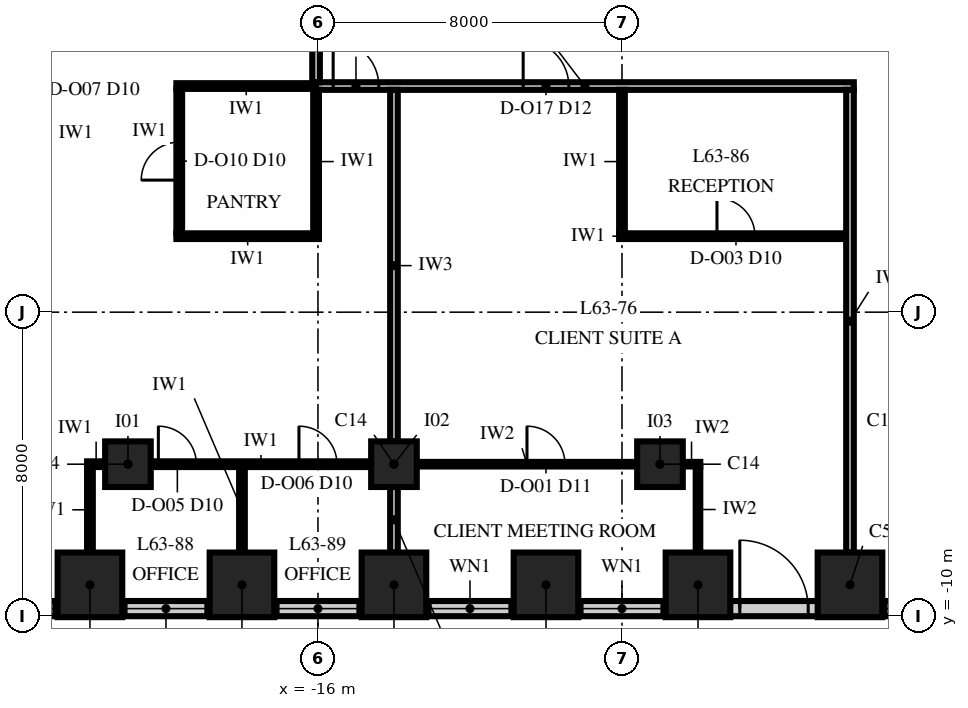
"""IFC4 building model, lengths in metres.
Left out: names, types, materials, properties, quantities, classifications, styles, units other than length and angle.
Written with IfcOpenShell. Run it as: python <this file> out.ifc"""

import sys

from ifc_helpers import new_model, si_unit, direction, frame, frame_2d, origin, origin_2d, place, context, subcontext, project, spatial, rectangle, extrude, element, fill, save


model = new_model("IFC4")
c1 = context("Model", 3, precision=1e-05, world=origin(), true_north=direction((0.0, 1.0)))
c2 = subcontext(c1, "Body", "Model", "MODEL_VIEW")
j1 = project(units=[si_unit("LENGTHUNIT", "METRE"), si_unit("PLANEANGLEUNIT", "RADIAN")], contexts=[c1])
p1 = place(None, origin())
s1 = spatial("IfcSite", under=j1, at=p1, CompositionType="ELEMENT")
p2 = place(p1, origin())
s2 = spatial("IfcBuilding", under=s1, at=p2, CompositionType="ELEMENT")
p3 = place(p2, frame((0.0, 0.0, 272.0)))
s3 = spatial("IfcBuildingStorey", under=s2, at=p3, CompositionType="ELEMENT", Elevation=272.0)
for number, where, z_axis, x_axis in (
    (1, (-22.0, -9.175, -0.25), (0.0, 0.0, 1.0), (1.0, 0.0, 0.0)),
    (2, (-18.0, -9.175, -0.25), (0.0, 0.0, 1.0), (1.0, 0.0, 0.0)),
    (3, (-14.0, -9.175, -0.25), (0.0, 0.0, 1.0), (1.0, 0.0, 0.0)),
    (4, (-10.0, -9.175, -0.25), (0.0, 0.0, 1.0), (1.0, 0.0, 0.0)),
    (5, (-6.0, -9.175, -0.25), (0.0, 0.0, 1.0), (1.0, 0.0, 0.0)),
    (6, (-2.0, -9.175, -0.25), (0.0, 0.0, 1.0), (1.0, 0.0, 0.0)),
):
    element("IfcColumn", number, at=place(p3, frame(where, z_axis=z_axis, x_axis=x_axis)), inside=s3, PredefinedType="COLUMN", context=c2, shape_type="SweptSolid", body=[
        extrude(rectangle(XDim=1.7, YDim=1.7, at=origin_2d()), origin(), (0.0, 0.0, 1.0), 4.25),
    ])
for number, where, z_axis, x_axis in (
    (7, (-21.0, -6.0, 0.0), (0.0, 0.0, 1.0), (1.0, 0.0, 0.0)),
    (8, (-14.0, -6.0, 0.0), (0.0, 0.0, 1.0), (1.0, 0.0, 0.0)),
    (9, (-7.0, -6.0, 0.0), (0.0, 0.0, 1.0), (1.0, 0.0, 0.0)),
):
    element("IfcColumn", number, at=place(p3, frame(where, z_axis=z_axis, x_axis=x_axis)), inside=s3, PredefinedType="COLUMN", context=c2, shape_type="SweptSolid", body=[
        extrude(rectangle(XDim=1.2, YDim=1.2, at=origin_2d()), origin(), (0.0, 0.0, 1.0), 4.0),
    ])
p4 = place(p3, frame((-26.0, -9.8, 0.0), z_axis=(0.0, 0.0, 1.0), x_axis=(1.0, 0.0, 0.0)))
e10 = element("IfcWall", 10, at=p4, inside=s3, PredefinedType="SOLIDWALL", context=c2, shape_type="SweptSolid", body=[
    extrude(rectangle(XDim=52.0, YDim=0.4, at=frame_2d((26.0, 0.0))), origin(), (0.0, 0.0, 1.0), 2.0),
])
p5 = place(p4, frame((0.95, 0.0, 0.8)))
e11 = element("IfcOpeningElement", 11, at=p5, cuts=e10, PredefinedType="OPENING", context=c2, shape_type="SweptSolid", body=[
    extrude(rectangle(XDim=2.1, YDim=1.15, at=frame_2d((1.05, 0.575))), frame((0.0, 0.215, 0.0), z_axis=(0.0, -1.0, 0.0), x_axis=(1.0, 0.0, 0.0)), (0.0, 0.0, 1.0), 0.43),
])
p6 = place(p4, frame((4.95, 0.0, 0.8)))
e12 = element("IfcOpeningElement", 12, at=p6, cuts=e10, PredefinedType="OPENING", context=c2, shape_type="SweptSolid", body=[
    extrude(rectangle(XDim=2.1, YDim=1.15, at=frame_2d((1.05, 0.575))), frame((0.0, 0.215, 0.0), z_axis=(0.0, -1.0, 0.0), x_axis=(1.0, 0.0, 0.0)), (0.0, 0.0, 1.0), 0.43),
])
p7 = place(p4, frame((8.95, 0.0, 0.8)))
e13 = element("IfcOpeningElement", 13, at=p7, cuts=e10, PredefinedType="OPENING", context=c2, shape_type="SweptSolid", body=[
    extrude(rectangle(XDim=2.1, YDim=1.15, at=frame_2d((1.05, 0.575))), frame((0.0, 0.215, 0.0), z_axis=(0.0, -1.0, 0.0), x_axis=(1.0, 0.0, 0.0)), (0.0, 0.0, 1.0), 0.43),
])
p8 = place(p4, frame((12.95, 0.0, 0.8)))
e14 = element("IfcOpeningElement", 14, at=p8, cuts=e10, PredefinedType="OPENING", context=c2, shape_type="SweptSolid", body=[
    extrude(rectangle(XDim=2.1, YDim=1.15, at=frame_2d((1.05, 0.575))), frame((0.0, 0.215, 0.0), z_axis=(0.0, -1.0, 0.0), x_axis=(1.0, 0.0, 0.0)), (0.0, 0.0, 1.0), 0.43),
])
p9 = place(p4, frame((16.95, 0.0, 0.8)))
e15 = element("IfcOpeningElement", 15, at=p9, cuts=e10, PredefinedType="OPENING", context=c2, shape_type="SweptSolid", body=[
    extrude(rectangle(XDim=2.1, YDim=1.15, at=frame_2d((1.05, 0.575))), frame((0.0, 0.215, 0.0), z_axis=(0.0, -1.0, 0.0), x_axis=(1.0, 0.0, 0.0)), (0.0, 0.0, 1.0), 0.43),
])
p10 = place(p4, frame((21.1, 0.0, 0.0)))
e16 = element("IfcOpeningElement", 16, at=p10, cuts=e10, PredefinedType="OPENING", context=c2, shape_type="SweptSolid", body=[
    extrude(rectangle(XDim=1.8, YDim=2.0, at=frame_2d((0.9, 1.0))), frame((0.0, 0.215, 0.0), z_axis=(0.0, -1.0, 0.0), x_axis=(1.0, 0.0, 0.0)), (0.0, 0.0, 1.0), 0.43),
])
p11 = place(p4, frame((24.95, 0.0, 0.8)))
e17 = element("IfcOpeningElement", 17, at=p11, cuts=e10, PredefinedType="OPENING", context=c2, shape_type="SweptSolid", body=[
    extrude(rectangle(XDim=2.1, YDim=1.15, at=frame_2d((1.05, 0.575))), frame((0.0, 0.215, 0.0), z_axis=(0.0, -1.0, 0.0), x_axis=(1.0, 0.0, 0.0)), (0.0, 0.0, 1.0), 0.43),
])
p12 = place(p4, frame((29.1, 0.0, 0.0)))
e18 = element("IfcOpeningElement", 18, at=p12, cuts=e10, PredefinedType="OPENING", context=c2, shape_type="SweptSolid", body=[
    extrude(rectangle(XDim=1.8, YDim=2.0, at=frame_2d((0.9, 1.0))), frame((0.0, 0.215, 0.0), z_axis=(0.0, -1.0, 0.0), x_axis=(1.0, 0.0, 0.0)), (0.0, 0.0, 1.0), 0.43),
])
p13 = place(p4, frame((32.95, 0.0, 0.8)))
e19 = element("IfcOpeningElement", 19, at=p13, cuts=e10, PredefinedType="OPENING", context=c2, shape_type="SweptSolid", body=[
    extrude(rectangle(XDim=2.1, YDim=1.15, at=frame_2d((1.05, 0.575))), frame((0.0, 0.215, 0.0), z_axis=(0.0, -1.0, 0.0), x_axis=(1.0, 0.0, 0.0)), (0.0, 0.0, 1.0), 0.43),
])
p14 = place(p4, frame((36.95, 0.0, 0.8)))
e20 = element("IfcOpeningElement", 20, at=p14, cuts=e10, PredefinedType="OPENING", context=c2, shape_type="SweptSolid", body=[
    extrude(rectangle(XDim=2.1, YDim=1.15, at=frame_2d((1.05, 0.575))), frame((0.0, 0.215, 0.0), z_axis=(0.0, -1.0, 0.0), x_axis=(1.0, 0.0, 0.0)), (0.0, 0.0, 1.0), 0.43),
])
p15 = place(p4, frame((40.95, 0.0, 0.8)))
e21 = element("IfcOpeningElement", 21, at=p15, cuts=e10, PredefinedType="OPENING", context=c2, shape_type="SweptSolid", body=[
    extrude(rectangle(XDim=2.1, YDim=1.15, at=frame_2d((1.05, 0.575))), frame((0.0, 0.215, 0.0), z_axis=(0.0, -1.0, 0.0), x_axis=(1.0, 0.0, 0.0)), (0.0, 0.0, 1.0), 0.43),
])
p16 = place(p4, frame((44.95, 0.0, 0.8)))
e22 = element("IfcOpeningElement", 22, at=p16, cuts=e10, PredefinedType="OPENING", context=c2, shape_type="SweptSolid", body=[
    extrude(rectangle(XDim=2.1, YDim=1.15, at=frame_2d((1.05, 0.575))), frame((0.0, 0.215, 0.0), z_axis=(0.0, -1.0, 0.0), x_axis=(1.0, 0.0, 0.0)), (0.0, 0.0, 1.0), 0.43),
])
p17 = place(p4, frame((48.95, 0.0, 0.8)))
e23 = element("IfcOpeningElement", 23, at=p17, cuts=e10, PredefinedType="OPENING", context=c2, shape_type="SweptSolid", body=[
    extrude(rectangle(XDim=2.1, YDim=1.15, at=frame_2d((1.05, 0.575))), frame((0.0, 0.215, 0.0), z_axis=(0.0, -1.0, 0.0), x_axis=(1.0, 0.0, 0.0)), (0.0, 0.0, 1.0), 0.43),
])
p18 = place(p3, frame((-22.075, -6.0, 0.0), z_axis=(0.0, 0.0, 1.0), x_axis=(1.0, 0.0, 0.0)))
e24 = element("IfcWall", 24, at=p18, inside=s3, PredefinedType="PARTITIONING", context=c2, shape_type="SweptSolid", body=[
    extrude(rectangle(XDim=0.475, YDim=0.15, at=frame_2d((0.237, 0.0))), origin(), (0.0, 0.0, 1.0), 2.842),
])
p19 = place(p3, frame((-20.4, -6.0, 0.0), z_axis=(0.0, 0.0, 1.0), x_axis=(1.0, 0.0, 0.0)))
e25 = element("IfcWall", 25, at=p19, inside=s3, PredefinedType="PARTITIONING", context=c2, shape_type="SweptSolid", body=[
    extrude(rectangle(XDim=5.8, YDim=0.15, at=frame_2d((2.9, 0.0))), origin(), (0.0, 0.0, 1.0), 2.842),
])
p20 = place(p19, frame((0.2, 0.0, 0.0)))
e26 = element("IfcOpeningElement", 26, at=p20, cuts=e25, PredefinedType="OPENING", context=c2, shape_type="SweptSolid", body=[
    extrude(rectangle(XDim=1.0, YDim=2.3, at=frame_2d((0.5, 1.15))), frame((0.0, 0.09, 0.0), z_axis=(0.0, -1.0, 0.0), x_axis=(1.0, 0.0, 0.0)), (0.0, 0.0, 1.0), 0.18),
])
p21 = place(p19, frame((3.9, 0.0, 0.0)))
e27 = element("IfcOpeningElement", 27, at=p21, cuts=e25, PredefinedType="OPENING", context=c2, shape_type="SweptSolid", body=[
    extrude(rectangle(XDim=1.0, YDim=2.3, at=frame_2d((0.5, 1.15))), frame((0.0, 0.09, 0.0), z_axis=(0.0, -1.0, 0.0), x_axis=(1.0, 0.0, 0.0)), (0.0, 0.0, 1.0), 0.18),
])
p22 = place(p3, frame((-13.4, -6.0, 0.0), z_axis=(0.0, 0.0, 1.0), x_axis=(1.0, 0.0, 0.0)))
e28 = element("IfcWall", 28, at=p22, inside=s3, PredefinedType="PARTITIONING", context=c2, shape_type="SweptSolid", body=[
    extrude(rectangle(XDim=5.8, YDim=0.12, at=frame_2d((2.9, 0.0))), origin(), (0.0, 0.0, 1.0), 2.842),
])
p23 = place(p22, frame((2.9, 0.0, 0.0)))
e29 = element("IfcOpeningElement", 29, at=p23, cuts=e28, PredefinedType="OPENING", context=c2, shape_type="SweptSolid", body=[
    extrude(rectangle(XDim=1.0, YDim=2.4, at=frame_2d((0.5, 1.2))), frame((0.0, 0.075, 0.0), z_axis=(0.0, -1.0, 0.0), x_axis=(1.0, 0.0, 0.0)), (0.0, 0.0, 1.0), 0.15),
])
p24 = place(p3, frame((-6.4, -6.0, 0.0), z_axis=(0.0, 0.0, 1.0), x_axis=(1.0, 0.0, 0.0)))
e30 = element("IfcWall", 30, at=p24, inside=s3, PredefinedType="PARTITIONING", context=c2, shape_type="SweptSolid", body=[
    extrude(rectangle(XDim=0.46, YDim=0.12, at=frame_2d((0.23, 0.0))), origin(), (0.0, 0.0, 1.0), 2.842),
])
p25 = place(p3, frame((-19.725, 0.0, 0.0), z_axis=(0.0, 0.0, 1.0), x_axis=(1.0, 0.0, 0.0)))
e31 = element("IfcWall", 31, at=p25, inside=s3, PredefinedType="PARTITIONING", context=c2, shape_type="SweptSolid", body=[
    extrude(rectangle(XDim=3.75, YDim=0.15, at=frame_2d((1.875, 0.0))), origin(), (0.0, 0.0, 1.0), 3.23),
])
p26 = place(p3, frame((-8.075, 0.0, 0.0), z_axis=(0.0, 0.0, 1.0), x_axis=(1.0, 0.0, 0.0)))
e32 = element("IfcWall", 32, at=p26, inside=s3, PredefinedType="PARTITIONING", context=c2, shape_type="SweptSolid", body=[
    extrude(rectangle(XDim=5.975, YDim=0.15, at=frame_2d((2.987, 0.0))), origin(), (0.0, 0.0, 1.0), 3.23),
])
p27 = place(p26, frame((2.575, 0.0, 0.0)))
e33 = element("IfcOpeningElement", 33, at=p27, cuts=e32, PredefinedType="OPENING", context=c2, shape_type="SweptSolid", body=[
    extrude(rectangle(XDim=1.0, YDim=2.3, at=frame_2d((0.5, 1.15))), frame((0.0, 0.09, 0.0), z_axis=(0.0, -1.0, 0.0), x_axis=(1.0, 0.0, 0.0)), (0.0, 0.0, 1.0), 0.18),
])
p28 = place(p3, frame((-19.725, 3.95, 0.0), z_axis=(0.0, 0.0, 1.0), x_axis=(1.0, 0.0, 0.0)))
e34 = element("IfcWall", 34, at=p28, inside=s3, PredefinedType="PARTITIONING", context=c2, shape_type="SweptSolid", body=[
    extrude(rectangle(XDim=3.675, YDim=0.15, at=frame_2d((1.837, 0.0))), origin(), (0.0, 0.0, 1.0), 3.23),
])
p29 = place(p3, frame((-16.05, 3.95, 0.0), z_axis=(0.0, 0.0, 1.0), x_axis=(1.0, 0.0, 0.0)))
e35 = element("IfcWall", 35, at=p29, inside=s3, PredefinedType="PARTITIONING", context=c2, shape_type="SweptSolid", body=[
    extrude(rectangle(XDim=14.15, YDim=0.2, at=frame_2d((7.075, 0.0))), origin(), (0.0, 0.0, 1.0), 3.23),
])
p30 = place(p29, frame((5.45, 0.0, 0.0)))
e36 = element("IfcOpeningElement", 36, at=p30, cuts=e35, PredefinedType="OPENING", context=c2, shape_type="SweptSolid", body=[
    extrude(rectangle(XDim=1.2, YDim=2.4, at=frame_2d((0.6, 1.2))), frame((0.0, 0.115, 0.0), z_axis=(0.0, -1.0, 0.0), x_axis=(1.0, 0.0, 0.0)), (0.0, 0.0, 1.0), 0.23),
])
p31 = place(p29, frame((0.45, 0.0, 0.0)))
e37 = element("IfcOpeningElement", 37, at=p31, cuts=e35, PredefinedType="OPENING", context=c2, shape_type="SweptSolid", body=[
    extrude(rectangle(XDim=1.2, YDim=2.4, at=frame_2d((0.6, 1.2))), frame((0.0, 0.115, 0.0), z_axis=(0.0, -1.0, 0.0), x_axis=(1.0, 0.0, 0.0)), (0.0, 0.0, 1.0), 0.23),
])
p32 = place(p3, frame((-22.0, -8.325, 0.0), z_axis=(0.0, 0.0, 1.0), x_axis=(0.0, 1.0, 0.0)))
e38 = element("IfcWall", 38, at=p32, inside=s3, PredefinedType="PARTITIONING", context=c2, shape_type="SweptSolid", body=[
    extrude(rectangle(XDim=2.25, YDim=0.15, at=frame_2d((1.125, 0.0))), origin(), (0.0, 0.0, 1.0), 2.842),
])
p33 = place(p3, frame((-19.65, 0.075, 0.0), z_axis=(0.0, 0.0, 1.0), x_axis=(0.0, 1.0, 0.0)))
e39 = element("IfcWall", 39, at=p33, inside=s3, PredefinedType="PARTITIONING", context=c2, shape_type="SweptSolid", body=[
    extrude(rectangle(XDim=3.8, YDim=0.15, at=frame_2d((1.9, 0.0))), origin(), (0.0, 0.0, 1.0), 3.85),
])
p34 = place(p33, frame((1.4, 0.0, 0.0)))
e40 = element("IfcOpeningElement", 40, at=p34, cuts=e39, PredefinedType="OPENING", context=c2, shape_type="SweptSolid", body=[
    extrude(rectangle(XDim=1.0, YDim=2.3, at=frame_2d((0.5, 1.15))), frame((0.0, 0.09, 0.0), z_axis=(0.0, -1.0, 0.0), x_axis=(1.0, 0.0, 0.0)), (0.0, 0.0, 1.0), 0.18),
])
p35 = place(p3, frame((-18.0, -8.325, 0.0), z_axis=(0.0, 0.0, 1.0), x_axis=(0.0, 1.0, 0.0)))
e41 = element("IfcWall", 41, at=p35, inside=s3, PredefinedType="PARTITIONING", context=c2, shape_type="SweptSolid", body=[
    extrude(rectangle(XDim=2.25, YDim=0.15, at=frame_2d((1.125, 0.0))), origin(), (0.0, 0.0, 1.0), 2.842),
])
p36 = place(p3, frame((-16.05, 0.075, 0.0), z_axis=(0.0, 0.0, 1.0), x_axis=(0.0, 1.0, 0.0)))
e42 = element("IfcWall", 42, at=p36, inside=s3, PredefinedType="PARTITIONING", context=c2, shape_type="SweptSolid", body=[
    extrude(rectangle(XDim=3.775, YDim=0.15, at=frame_2d((1.888, 0.0))), origin(), (0.0, 0.0, 1.0), 3.85),
])
p37 = place(p3, frame((-16.05, 4.05, 0.0), z_axis=(0.0, 0.0, 1.0), x_axis=(0.0, 1.0, 0.0)))
e43 = element("IfcWall", 43, at=p37, inside=s3, PredefinedType="PARTITIONING", context=c2, shape_type="SweptSolid", body=[
    extrude(rectangle(XDim=21.9, YDim=0.2, at=frame_2d((10.95, 0.0))), origin(), (0.0, 0.0, 1.0), 2.842),
])
p38 = place(p37, frame((20.35, 0.0, 0.0)))
e44 = element("IfcOpeningElement", 44, at=p38, cuts=e43, PredefinedType="OPENING", context=c2, shape_type="SweptSolid", body=[
    extrude(rectangle(XDim=1.2, YDim=2.4, at=frame_2d((0.6, 1.2))), frame((0.0, 0.115, 0.0), z_axis=(0.0, -1.0, 0.0), x_axis=(1.0, 0.0, 0.0)), (0.0, 0.0, 1.0), 0.23),
])
p39 = place(p3, frame((-14.0, -8.325, 0.0), z_axis=(0.0, 0.0, 1.0), x_axis=(0.0, 1.0, 0.0)))
e45 = element("IfcWall", 45, at=p39, inside=s3, PredefinedType="PARTITIONING", context=c2, shape_type="SweptSolid", body=[
    extrude(rectangle(XDim=1.725, YDim=0.2, at=frame_2d((0.862, 0.0))), origin(), (0.0, 0.0, 1.0), 3.23),
])
p40 = place(p3, frame((-14.0, -5.4, 0.0), z_axis=(0.0, 0.0, 1.0), x_axis=(0.0, 1.0, 0.0)))
e46 = element("IfcWall", 46, at=p40, inside=s3, PredefinedType="PARTITIONING", context=c2, shape_type="SweptSolid", body=[
    extrude(rectangle(XDim=9.25, YDim=0.2, at=frame_2d((4.625, 0.0))), origin(), (0.0, 0.0, 1.0), 3.23),
])
p41 = place(p3, frame((-8.0, 0.075, 0.0), z_axis=(0.0, 0.0, 1.0), x_axis=(0.0, 1.0, 0.0)))
e47 = element("IfcWall", 47, at=p41, inside=s3, PredefinedType="PARTITIONING", context=c2, shape_type="SweptSolid", body=[
    extrude(rectangle(XDim=3.775, YDim=0.15, at=frame_2d((1.888, 0.0))), origin(), (0.0, 0.0, 1.0), 3.85),
])
p42 = place(p3, frame((-6.0, -8.325, 0.0), z_axis=(0.0, 0.0, 1.0), x_axis=(0.0, 1.0, 0.0)))
e48 = element("IfcWall", 48, at=p42, inside=s3, PredefinedType="PARTITIONING", context=c2, shape_type="SweptSolid", body=[
    extrude(rectangle(XDim=2.265, YDim=0.12, at=frame_2d((1.132, 0.0))), origin(), (0.0, 0.0, 1.0), 2.842),
])
p43 = place(p3, frame((-2.0, -8.325, 0.0), z_axis=(0.0, 0.0, 1.0), x_axis=(0.0, 1.0, 0.0)))
e49 = element("IfcWall", 49, at=p43, inside=s3, PredefinedType="PARTITIONING", context=c2, shape_type="SweptSolid", body=[
    extrude(rectangle(XDim=12.175, YDim=0.2, at=frame_2d((6.087, 0.0))), origin(), (0.0, 0.0, 1.0), 2.842),
])
p44 = place(p5, origin())
e50 = element("IfcWindow", 50, at=p44, inside=s3, PartitioningType="SINGLE_PANEL", PredefinedType="WINDOW", context=c2, shape_type="SweptSolid", body=[
    extrude(rectangle(XDim=2.1, YDim=1.15, at=frame_2d((1.05, 0.575))), frame((0.0, 0.03, 0.0), z_axis=(0.0, -1.0, 0.0), x_axis=(1.0, 0.0, 0.0)), (0.0, 0.0, 1.0), 0.06),
])
fill(e11, e50)
p45 = place(p6, origin())
e51 = element("IfcWindow", 51, at=p45, inside=s3, PartitioningType="SINGLE_PANEL", PredefinedType="WINDOW", context=c2, shape_type="SweptSolid", body=[
    extrude(rectangle(XDim=2.1, YDim=1.15, at=frame_2d((1.05, 0.575))), frame((0.0, 0.03, 0.0), z_axis=(0.0, -1.0, 0.0), x_axis=(1.0, 0.0, 0.0)), (0.0, 0.0, 1.0), 0.06),
])
fill(e12, e51)
p46 = place(p7, origin())
e52 = element("IfcWindow", 52, at=p46, inside=s3, PartitioningType="SINGLE_PANEL", PredefinedType="WINDOW", context=c2, shape_type="SweptSolid", body=[
    extrude(rectangle(XDim=2.1, YDim=1.15, at=frame_2d((1.05, 0.575))), frame((0.0, 0.03, 0.0), z_axis=(0.0, -1.0, 0.0), x_axis=(1.0, 0.0, 0.0)), (0.0, 0.0, 1.0), 0.06),
])
fill(e13, e52)
p47 = place(p8, origin())
e53 = element("IfcWindow", 53, at=p47, inside=s3, PartitioningType="SINGLE_PANEL", PredefinedType="WINDOW", context=c2, shape_type="SweptSolid", body=[
    extrude(rectangle(XDim=2.1, YDim=1.15, at=frame_2d((1.05, 0.575))), frame((0.0, 0.03, 0.0), z_axis=(0.0, -1.0, 0.0), x_axis=(1.0, 0.0, 0.0)), (0.0, 0.0, 1.0), 0.06),
])
fill(e14, e53)
p48 = place(p9, origin())
e54 = element("IfcWindow", 54, at=p48, inside=s3, PartitioningType="SINGLE_PANEL", PredefinedType="WINDOW", context=c2, shape_type="SweptSolid", body=[
    extrude(rectangle(XDim=2.1, YDim=1.15, at=frame_2d((1.05, 0.575))), frame((0.0, 0.03, 0.0), z_axis=(0.0, -1.0, 0.0), x_axis=(1.0, 0.0, 0.0)), (0.0, 0.0, 1.0), 0.06),
])
fill(e15, e54)
p49 = place(p10, origin())
e55 = element("IfcDoor", 55, at=p49, inside=s3, OperationType="DOUBLE_DOOR_SINGLE_SWING", PredefinedType="DOOR", context=c2, shape_type="SweptSolid", body=[
    extrude(rectangle(XDim=1.8, YDim=2.0, at=frame_2d((0.9, 1.0))), frame((0.0, 0.2, 0.0), z_axis=(0.0, -1.0, 0.0), x_axis=(1.0, 0.0, 0.0)), (0.0, 0.0, 1.0), 0.399),
])
fill(e16, e55)
p50 = place(p11, origin())
e56 = element("IfcWindow", 56, at=p50, inside=s3, PartitioningType="SINGLE_PANEL", PredefinedType="WINDOW", context=c2, shape_type="SweptSolid", body=[
    extrude(rectangle(XDim=2.1, YDim=1.15, at=frame_2d((1.05, 0.575))), frame((0.0, 0.03, 0.0), z_axis=(0.0, -1.0, 0.0), x_axis=(1.0, 0.0, 0.0)), (0.0, 0.0, 1.0), 0.06),
])
fill(e17, e56)
p51 = place(p23, origin())
e57 = element("IfcDoor", 57, at=p51, inside=s3, OperationType="SINGLE_SWING_RIGHT", PredefinedType="DOOR", context=c2, shape_type="SweptSolid", body=[
    extrude(rectangle(XDim=1.0, YDim=2.4, at=frame_2d((0.5, 1.2))), frame((0.0, 0.06, 0.0), z_axis=(0.0, -1.0, 0.0), x_axis=(1.0, 0.0, 0.0)), (0.0, 0.0, 1.0), 0.12),
])
fill(e29, e57)
p52 = place(p27, origin())
e58 = element("IfcDoor", 58, at=p52, inside=s3, OperationType="SINGLE_SWING_LEFT", PredefinedType="DOOR", context=c2, shape_type="SweptSolid", body=[
    extrude(rectangle(XDim=1.0, YDim=2.3, at=frame_2d((0.5, 1.15))), frame((0.0, 0.075, 0.0), z_axis=(0.0, -1.0, 0.0), x_axis=(1.0, 0.0, 0.0)), (0.0, 0.0, 1.0), 0.149),
])
fill(e33, e58)
p53 = place(p20, origin())
e59 = element("IfcDoor", 59, at=p53, inside=s3, OperationType="SINGLE_SWING_LEFT", PredefinedType="DOOR", context=c2, shape_type="SweptSolid", body=[
    extrude(rectangle(XDim=1.0, YDim=2.3, at=frame_2d((0.5, 1.15))), frame((0.0, 0.075, 0.0), z_axis=(0.0, -1.0, 0.0), x_axis=(1.0, 0.0, 0.0)), (0.0, 0.0, 1.0), 0.149),
])
fill(e26, e59)
p54 = place(p21, origin())
e60 = element("IfcDoor", 60, at=p54, inside=s3, OperationType="SINGLE_SWING_LEFT", PredefinedType="DOOR", context=c2, shape_type="SweptSolid", body=[
    extrude(rectangle(XDim=1.0, YDim=2.3, at=frame_2d((0.5, 1.15))), frame((0.0, 0.075, 0.0), z_axis=(0.0, -1.0, 0.0), x_axis=(1.0, 0.0, 0.0)), (0.0, 0.0, 1.0), 0.149),
])
fill(e27, e60)
p55 = place(p34, origin())
e61 = element("IfcDoor", 61, at=p55, inside=s3, OperationType="SINGLE_SWING_LEFT", PredefinedType="DOOR", context=c2, shape_type="SweptSolid", body=[
    extrude(rectangle(XDim=1.0, YDim=2.3, at=frame_2d((0.5, 1.15))), frame((0.0, 0.075, 0.0), z_axis=(0.0, -1.0, 0.0), x_axis=(1.0, 0.0, 0.0)), (0.0, 0.0, 1.0), 0.149),
])
fill(e40, e61)
p56 = place(p30, origin())
e62 = element("IfcDoor", 62, at=p56, inside=s3, OperationType="SINGLE_SWING_LEFT", PredefinedType="DOOR", context=c2, shape_type="SweptSolid", body=[
    extrude(rectangle(XDim=1.2, YDim=2.4, at=frame_2d((0.6, 1.2))), frame((0.0, 0.1, 0.0), z_axis=(0.0, -1.0, 0.0), x_axis=(1.0, 0.0, 0.0)), (0.0, 0.0, 1.0), 0.199),
])
fill(e36, e62)
p57 = place(p31, origin())
e63 = element("IfcDoor", 63, at=p57, inside=s3, OperationType="SINGLE_SWING_LEFT", PredefinedType="DOOR", context=c2, shape_type="SweptSolid", body=[
    extrude(rectangle(XDim=1.2, YDim=2.4, at=frame_2d((0.6, 1.2))), frame((0.0, 0.1, 0.0), z_axis=(0.0, -1.0, 0.0), x_axis=(1.0, 0.0, 0.0)), (0.0, 0.0, 1.0), 0.199),
])
fill(e37, e63)
save(model, sys.argv[1])
